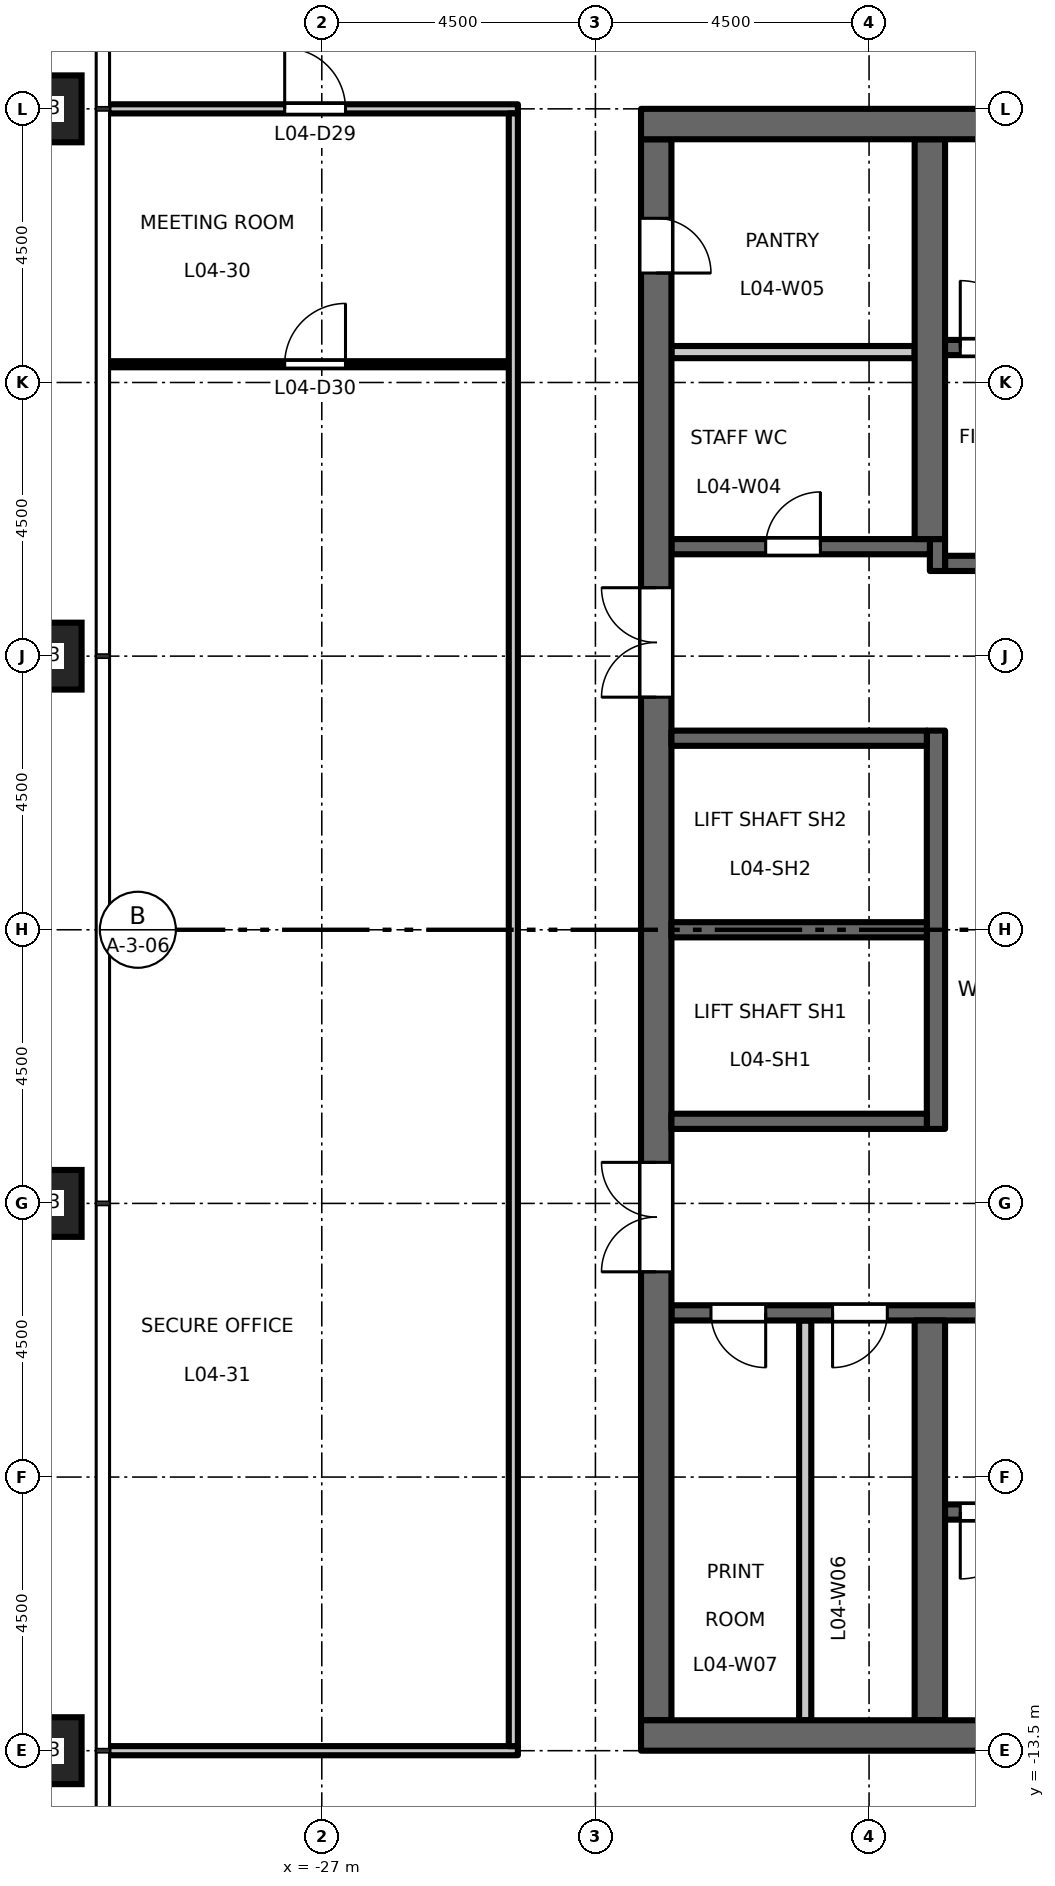
"""IFC4 building model, lengths in metres.
Left out: names, types, materials, properties, quantities, classifications, styles, units other than length and angle.
Written with IfcOpenShell. Run it as: python <this file> out.ifc"""

import sys

from ifc_helpers import new_model, si_unit, direction, frame, frame_2d, origin, origin_2d, place, context, subcontext, project, spatial, rectangle, hollow_rectangle, extrude, element, fill, save


model = new_model("IFC4")
c1 = context("Model", 3, precision=1e-05, world=origin(), true_north=direction((0.0, 1.0)))
c2 = subcontext(c1, "Body", "Model", "MODEL_VIEW")
j1 = project(units=[si_unit("LENGTHUNIT", "METRE"), si_unit("PLANEANGLEUNIT", "RADIAN")], contexts=[c1])
p1 = place(None, origin())
s1 = spatial("IfcSite", under=j1, at=p1, CompositionType="ELEMENT")
p2 = place(p1, origin())
s2 = spatial("IfcBuilding", under=s1, at=p2, CompositionType="ELEMENT")
p3 = place(p2, frame((0.0, 0.0, 22.2)))
s3 = spatial("IfcBuildingStorey", under=s2, at=p3, CompositionType="ELEMENT", Elevation=22.2)
for number, where, z_axis, x_axis in (
    (1, (-31.5, 13.5, 0.0), (0.0, 0.0, 1.0), (1.0, 0.0, 0.0)),
    (2, (-31.5, 4.5, 0.0), (0.0, 0.0, 1.0), (1.0, 0.0, 0.0)),
    (3, (-31.5, -4.5, 0.0), (0.0, 0.0, 1.0), (1.0, 0.0, 0.0)),
    (4, (-31.5, -13.5, 0.0), (0.0, 0.0, 1.0), (1.0, 0.0, 0.0)),
):
    element("IfcColumn", number, at=place(p3, frame(where, z_axis=z_axis, x_axis=x_axis)), inside=s3, PredefinedType="COLUMN", context=c2, shape_type="SweptSolid", body=[
        extrude(hollow_rectangle(XDim=1.1, YDim=1.1, WallThickness=0.07, at=origin_2d()), origin(), (0.0, 0.0, 1.0), 4.5),
    ])
p4 = place(p3, frame((-12.15, 6.025, 0.0), z_axis=(0.0, 0.0, 1.0), x_axis=(-1.0, 0.0, 0.0)))
e5 = element("IfcWall", 5, at=p4, inside=s3, PredefinedType="SHEAR", context=c2, shape_type="SweptSolid", body=[
    extrude(rectangle(XDim=4.6, YDim=0.25, at=frame_2d((2.3, 0.0))), origin(), (0.0, 0.0, 1.0), 4.35),
])
p5 = place(p4, frame((1.8, 0.0, 0.0)))
e6 = element("IfcOpeningElement", 6, at=p5, cuts=e5, PredefinedType="OPENING", context=c2, shape_type="SweptSolid", body=[
    extrude(rectangle(XDim=1.0, YDim=2.1, at=frame_2d((0.5, 1.05))), frame((0.0, 0.135, 0.0), z_axis=(0.0, -1.0, 0.0), x_axis=(1.0, 0.0, 0.0)), (0.0, 0.0, 1.0), 0.27),
])
p6 = place(p3, frame((-16.875, 5.9, 0.0), z_axis=(0.0, 0.0, 1.0), x_axis=(0.0, 1.0, 0.0)))
e7 = element("IfcWall", 7, at=p6, inside=s3, PredefinedType="SHEAR", context=c2, shape_type="SweptSolid", body=[
    extrude(rectangle(XDim=0.525, YDim=0.25, at=frame_2d((0.263, 0.0))), origin(), (0.0, 0.0, 1.0), 4.35),
])
p7 = place(p3, frame((-17.0, 6.3, 0.0), z_axis=(0.0, 0.0, 1.0), x_axis=(-1.0, 0.0, 0.0)))
e8 = element("IfcWall", 8, at=p7, inside=s3, PredefinedType="SHEAR", context=c2, shape_type="SweptSolid", body=[
    extrude(rectangle(XDim=4.25, YDim=0.25, at=frame_2d((2.125, 0.0))), origin(), (0.0, 0.0, 1.0), 4.35),
])
p8 = place(p7, frame((1.8, 0.0, 0.0)))
e9 = element("IfcOpeningElement", 9, at=p8, cuts=e8, PredefinedType="OPENING", context=c2, shape_type="SweptSolid", body=[
    extrude(rectangle(XDim=0.9, YDim=2.1, at=frame_2d((0.45, 1.05))), frame((0.0, 0.135, 0.0), z_axis=(0.0, -1.0, 0.0), x_axis=(1.0, 0.0, 0.0)), (0.0, 0.0, 1.0), 0.27),
])
p9 = place(p3, frame((-12.15, -6.3, 0.0), z_axis=(0.0, 0.0, 1.0), x_axis=(-1.0, 0.0, 0.0)))
e10 = element("IfcWall", 10, at=p9, inside=s3, PredefinedType="SHEAR", context=c2, shape_type="SweptSolid", body=[
    extrude(rectangle(XDim=9.1, YDim=0.25, at=frame_2d((4.55, 0.0))), origin(), (0.0, 0.0, 1.0), 4.35),
])
p10 = place(p9, frame((1.8, 0.0, 0.0)))
e11 = element("IfcOpeningElement", 11, at=p10, cuts=e10, PredefinedType="OPENING", context=c2, shape_type="SweptSolid", body=[
    extrude(rectangle(XDim=1.0, YDim=2.1, at=frame_2d((0.5, 1.05))), frame((0.0, 0.135, 0.0), z_axis=(0.0, -1.0, 0.0), x_axis=(1.0, 0.0, 0.0)), (0.0, 0.0, 1.0), 0.27),
])
p11 = place(p9, frame((5.55, 0.0, 0.0)))
e12 = element("IfcOpeningElement", 12, at=p11, cuts=e10, PredefinedType="OPENING", context=c2, shape_type="SweptSolid", body=[
    extrude(rectangle(XDim=0.9, YDim=2.1, at=frame_2d((0.45, 1.05))), frame((0.0, 0.135, 0.0), z_axis=(0.0, -1.0, 0.0), x_axis=(1.0, 0.0, 0.0)), (0.0, 0.0, 1.0), 0.27),
])
p12 = place(p9, frame((7.55, 0.0, 0.0)))
e13 = element("IfcOpeningElement", 13, at=p12, cuts=e10, PredefinedType="OPENING", context=c2, shape_type="SweptSolid", body=[
    extrude(rectangle(XDim=0.9, YDim=2.1, at=frame_2d((0.45, 1.05))), frame((0.0, 0.135, 0.0), z_axis=(0.0, -1.0, 0.0), x_axis=(1.0, 0.0, 0.0)), (0.0, 0.0, 1.0), 0.27),
])
p13 = place(p3, frame((-21.5, -13.0, 0.0), z_axis=(0.0, 0.0, 1.0), x_axis=(0.0, 1.0, 0.0)))
e14 = element("IfcWall", 14, at=p13, inside=s3, PredefinedType="SHEAR", context=c2, shape_type="SweptSolid", body=[
    extrude(rectangle(XDim=26.0, YDim=0.5, at=frame_2d((13.0, 0.0))), origin(), (0.0, 0.0, 1.0), 4.35),
])
p14 = place(p13, frame((16.825, 0.0, 0.0)))
e15 = element("IfcOpeningElement", 15, at=p14, cuts=e14, PredefinedType="OPENING", context=c2, shape_type="SweptSolid", body=[
    extrude(rectangle(XDim=1.8, YDim=2.1, at=frame_2d((0.9, 1.05))), frame((0.0, 0.26, 0.0), z_axis=(0.0, -1.0, 0.0), x_axis=(1.0, 0.0, 0.0)), (0.0, 0.0, 1.0), 0.52),
])
p15 = place(p13, frame((7.375, 0.0, 0.0)))
e16 = element("IfcOpeningElement", 16, at=p15, cuts=e14, PredefinedType="OPENING", context=c2, shape_type="SweptSolid", body=[
    extrude(rectangle(XDim=1.8, YDim=2.1, at=frame_2d((0.9, 1.05))), frame((0.0, 0.26, 0.0), z_axis=(0.0, -1.0, 0.0), x_axis=(1.0, 0.0, 0.0)), (0.0, 0.0, 1.0), 0.52),
])
p16 = place(p13, frame((23.8, 0.0, 0.0)))
e17 = element("IfcOpeningElement", 17, at=p16, cuts=e14, PredefinedType="OPENING", context=c2, shape_type="SweptSolid", body=[
    extrude(rectangle(XDim=0.9, YDim=2.1, at=frame_2d((0.45, 1.05))), frame((0.0, 0.26, 0.0), z_axis=(0.0, -1.0, 0.0), x_axis=(1.0, 0.0, 0.0)), (0.0, 0.0, 1.0), 0.52),
])
p17 = place(p3, frame((-17.25, 9.5, 0.0), z_axis=(0.0, 0.0, 1.0), x_axis=(-1.0, 0.0, 0.0)))
e18 = element("IfcWall", 18, at=p17, inside=s3, PredefinedType="PARTITIONING", context=c2, shape_type="SweptSolid", body=[
    extrude(rectangle(XDim=4.0, YDim=0.2, at=frame_2d((2.0, 0.0))), origin(), (0.0, 0.0, 1.0), 4.35),
])
p18 = place(p3, frame((-19.05, -13.0, 0.0), z_axis=(0.0, 0.0, 1.0), x_axis=(0.0, 1.0, 0.0)))
e19 = element("IfcWall", 19, at=p18, inside=s3, PredefinedType="PARTITIONING", context=c2, shape_type="SweptSolid", body=[
    extrude(rectangle(XDim=6.575, YDim=0.2, at=frame_2d((3.288, 0.0))), origin(), (0.0, 0.0, 1.0), 4.35),
])
p19 = place(p3, frame((-16.9, -3.275, 0.0), z_axis=(0.0, 0.0, 1.0), x_axis=(0.0, 1.0, 0.0)))
e20 = element("IfcWall", 20, at=p19, inside=s3, PredefinedType="SHEAR", context=c2, shape_type="SweptSolid", body=[
    extrude(rectangle(XDim=6.55, YDim=0.3, at=frame_2d((3.275, 0.0))), origin(), (0.0, 0.0, 1.0), 4.35),
])
for number, where, z_axis, x_axis in (
    (21, (-17.05, 0.0, 0.0), (0.0, 0.0, 1.0), (-1.0, 0.0, 0.0)),
    (22, (-17.05, 3.15, 0.0), (0.0, 0.0, 1.0), (-1.0, 0.0, 0.0)),
    (23, (-17.05, -3.15, 0.0), (0.0, 0.0, 1.0), (-1.0, 0.0, 0.0)),
):
    element("IfcWall", number, at=place(p3, frame(where, z_axis=z_axis, x_axis=x_axis)), inside=s3, PredefinedType="SHEAR", context=c2, shape_type="SweptSolid", body=[
        extrude(rectangle(XDim=4.2, YDim=0.25, at=frame_2d((2.1, 0.0))), origin(), (0.0, 0.0, 1.0), 4.35),
    ])
for number, where, z_axis, x_axis in (
    (24, (-17.0, 6.425, 0.0), (0.0, 0.0, 1.0), (0.0, 1.0, 0.0)),
    (25, (-17.0, -13.0, 0.0), (0.0, 0.0, 1.0), (0.0, 1.0, 0.0)),
):
    element("IfcWall", number, at=place(p3, frame(where, z_axis=z_axis, x_axis=x_axis)), inside=s3, PredefinedType="SHEAR", context=c2, shape_type="SweptSolid", body=[
        extrude(rectangle(XDim=6.575, YDim=0.5, at=frame_2d((3.288, 0.0))), origin(), (0.0, 0.0, 1.0), 4.35),
    ])
p20 = place(p3, frame((-8.75, 9.575, 0.0), z_axis=(0.0, 0.0, 1.0), x_axis=(-1.0, 0.0, 0.0)))
e26 = element("IfcWall", 26, at=p20, inside=s3, PredefinedType="SHEAR", context=c2, shape_type="SweptSolid", body=[
    extrude(rectangle(XDim=8.0, YDim=0.25, at=frame_2d((4.0, 0.0))), origin(), (0.0, 0.0, 1.0), 4.35),
])
p21 = place(p20, frame((6.65, 0.0, 0.0)))
e27 = element("IfcOpeningElement", 27, at=p21, cuts=e26, PredefinedType="OPENING", context=c2, shape_type="SweptSolid", body=[
    extrude(rectangle(XDim=1.1, YDim=2.1, at=frame_2d((0.55, 1.05))), frame((0.0, 0.135, 0.0), z_axis=(0.0, -1.0, 0.0), x_axis=(1.0, 0.0, 0.0)), (0.0, 0.0, 1.0), 0.27),
])
p22 = place(p3, frame((-8.75, -9.575, 0.0), z_axis=(0.0, 0.0, 1.0), x_axis=(-1.0, 0.0, 0.0)))
e28 = element("IfcWall", 28, at=p22, inside=s3, PredefinedType="SHEAR", context=c2, shape_type="SweptSolid", body=[
    extrude(rectangle(XDim=8.0, YDim=0.25, at=frame_2d((4.0, 0.0))), origin(), (0.0, 0.0, 1.0), 4.35),
])
p23 = place(p22, frame((6.65, 0.0, 0.0)))
e29 = element("IfcOpeningElement", 29, at=p23, cuts=e28, PredefinedType="OPENING", context=c2, shape_type="SweptSolid", body=[
    extrude(rectangle(XDim=1.1, YDim=2.1, at=frame_2d((0.55, 1.05))), frame((0.0, 0.135, 0.0), z_axis=(0.0, -1.0, 0.0), x_axis=(1.0, 0.0, 0.0)), (0.0, 0.0, 1.0), 0.27),
])
for number, where, z_axis, x_axis in (
    (30, (-8.25, 13.25, 0.0), (0.0, 0.0, 1.0), (-1.0, 0.0, 0.0)),
    (31, (-8.25, -13.25, 0.0), (0.0, 0.0, 1.0), (-1.0, 0.0, 0.0)),
):
    element("IfcWall", number, at=place(p3, frame(where, z_axis=z_axis, x_axis=x_axis)), inside=s3, PredefinedType="SHEAR", context=c2, shape_type="SweptSolid", body=[
        extrude(rectangle(XDim=13.5, YDim=0.5, at=frame_2d((6.75, 0.0))), origin(), (0.0, 0.0, 1.0), 4.35),
    ])
p24 = place(p3, frame((-30.51, -13.5, 0.0), z_axis=(0.0, 0.0, 1.0), x_axis=(1.0, 0.0, 0.0)))
e32 = element("IfcWall", 32, at=p24, inside=s3, PredefinedType="PARTITIONING", context=c2, shape_type="SweptSolid", body=[
    extrude(rectangle(XDim=6.735, YDim=0.15, at=frame_2d((3.368, 0.0))), origin(), (0.0, 0.0, 1.0), 3.35),
])
p25 = place(p3, frame((-30.51, 9.3, 0.0), z_axis=(0.0, 0.0, 1.0), x_axis=(1.0, 0.0, 0.0)))
e33 = element("IfcWall", 33, at=p25, inside=s3, PredefinedType="PARTITIONING", context=c2, shape_type="SweptSolid", body=[
    extrude(rectangle(XDim=6.585, YDim=0.1, at=frame_2d((3.292, 0.0))), origin(), (0.0, 0.0, 1.0), 4.35),
])
p26 = place(p25, frame((2.9, 0.0, 0.0)))
e34 = element("IfcOpeningElement", 34, at=p26, cuts=e33, PredefinedType="OPENING", context=c2, shape_type="SweptSolid", body=[
    extrude(rectangle(XDim=1.0, YDim=2.1, at=frame_2d((0.5, 1.05))), frame((0.0, 0.06, 0.0), z_axis=(0.0, -1.0, 0.0), x_axis=(1.0, 0.0, 0.0)), (0.0, 0.0, 1.0), 0.12),
])
p27 = place(p3, frame((-30.51, 13.5, 0.0), z_axis=(0.0, 0.0, 1.0), x_axis=(1.0, 0.0, 0.0)))
e35 = element("IfcWall", 35, at=p27, inside=s3, PredefinedType="PARTITIONING", context=c2, shape_type="SweptSolid", body=[
    extrude(rectangle(XDim=6.735, YDim=0.15, at=frame_2d((3.368, 0.0))), origin(), (0.0, 0.0, 1.0), 3.35),
])
p28 = place(p27, frame((2.9, 0.0, 0.0)))
e36 = element("IfcOpeningElement", 36, at=p28, cuts=e35, PredefinedType="OPENING", context=c2, shape_type="SweptSolid", body=[
    extrude(rectangle(XDim=1.0, YDim=2.1, at=frame_2d((0.5, 1.05))), frame((0.0, 0.085, 0.0), z_axis=(0.0, -1.0, 0.0), x_axis=(1.0, 0.0, 0.0)), (0.0, 0.0, 1.0), 0.17),
])
p29 = place(p3, frame((-23.85, -13.425, 0.0), z_axis=(0.0, 0.0, 1.0), x_axis=(0.0, 1.0, 0.0)))
e37 = element("IfcWall", 37, at=p29, inside=s3, PredefinedType="PARTITIONING", context=c2, shape_type="SweptSolid", body=[
    extrude(rectangle(XDim=26.85, YDim=0.15, at=frame_2d((13.425, 0.0))), origin(), (0.0, 0.0, 1.0), 4.35),
])
p30 = place(p21, origin())
e38 = element("IfcDoor", 38, at=p30, inside=s3, OperationType="SINGLE_SWING_RIGHT", PredefinedType="DOOR", context=c2, shape_type="SweptSolid", body=[
    extrude(rectangle(XDim=1.1, YDim=2.1, at=frame_2d((0.55, 1.05))), frame((0.0, 0.025, 0.0), z_axis=(0.0, -1.0, 0.0), x_axis=(1.0, 0.0, 0.0)), (0.0, 0.0, 1.0), 0.05),
])
fill(e27, e38)
p31 = place(p23, origin())
e39 = element("IfcDoor", 39, at=p31, inside=s3, OperationType="SINGLE_SWING_LEFT", PredefinedType="DOOR", context=c2, shape_type="SweptSolid", body=[
    extrude(rectangle(XDim=1.1, YDim=2.1, at=frame_2d((0.55, 1.05))), frame((0.0, 0.025, 0.0), z_axis=(0.0, -1.0, 0.0), x_axis=(1.0, 0.0, 0.0)), (0.0, 0.0, 1.0), 0.05),
])
fill(e29, e39)
p32 = place(p14, origin())
e40 = element("IfcDoor", 40, at=p32, inside=s3, OperationType="DOUBLE_DOOR_DOUBLE_SWING", PredefinedType="DOOR", context=c2, shape_type="SweptSolid", body=[
    extrude(rectangle(XDim=1.8, YDim=2.1, at=frame_2d((0.9, 1.05))), frame((0.0, 0.025, 0.0), z_axis=(0.0, -1.0, 0.0), x_axis=(1.0, 0.0, 0.0)), (0.0, 0.0, 1.0), 0.05),
])
fill(e15, e40)
p33 = place(p15, origin())
e41 = element("IfcDoor", 41, at=p33, inside=s3, OperationType="DOUBLE_DOOR_DOUBLE_SWING", PredefinedType="DOOR", context=c2, shape_type="SweptSolid", body=[
    extrude(rectangle(XDim=1.8, YDim=2.1, at=frame_2d((0.9, 1.05))), frame((0.0, 0.025, 0.0), z_axis=(0.0, -1.0, 0.0), x_axis=(1.0, 0.0, 0.0)), (0.0, 0.0, 1.0), 0.05),
])
fill(e16, e41)
p34 = place(p8, origin())
e42 = element("IfcDoor", 42, at=p34, inside=s3, OperationType="SINGLE_SWING_LEFT", PredefinedType="DOOR", context=c2, shape_type="SweptSolid", body=[
    extrude(rectangle(XDim=0.9, YDim=2.1, at=frame_2d((0.45, 1.05))), frame((0.0, 0.025, 0.0), z_axis=(0.0, -1.0, 0.0), x_axis=(1.0, 0.0, 0.0)), (0.0, 0.0, 1.0), 0.05),
])
fill(e9, e42)
p35 = place(p16, origin())
e43 = element("IfcDoor", 43, at=p35, inside=s3, OperationType="SINGLE_SWING_LEFT", PredefinedType="DOOR", context=c2, shape_type="SweptSolid", body=[
    extrude(rectangle(XDim=0.9, YDim=2.1, at=frame_2d((0.45, 1.05))), frame((0.0, 0.025, 0.0), z_axis=(0.0, -1.0, 0.0), x_axis=(1.0, 0.0, 0.0)), (0.0, 0.0, 1.0), 0.05),
])
fill(e17, e43)
p36 = place(p11, origin())
e44 = element("IfcDoor", 44, at=p36, inside=s3, OperationType="SINGLE_SWING_LEFT", PredefinedType="DOOR", context=c2, shape_type="SweptSolid", body=[
    extrude(rectangle(XDim=0.9, YDim=2.1, at=frame_2d((0.45, 1.05))), frame((0.0, 0.025, 0.0), z_axis=(0.0, -1.0, 0.0), x_axis=(1.0, 0.0, 0.0)), (0.0, 0.0, 1.0), 0.05),
])
fill(e12, e44)
p37 = place(p12, origin())
e45 = element("IfcDoor", 45, at=p37, inside=s3, OperationType="SINGLE_SWING_RIGHT", PredefinedType="DOOR", context=c2, shape_type="SweptSolid", body=[
    extrude(rectangle(XDim=0.9, YDim=2.1, at=frame_2d((0.45, 1.05))), frame((0.0, 0.025, 0.0), z_axis=(0.0, -1.0, 0.0), x_axis=(1.0, 0.0, 0.0)), (0.0, 0.0, 1.0), 0.05),
])
fill(e13, e45)
p38 = place(p28, origin())
e46 = element("IfcDoor", 46, at=p38, inside=s3, OperationType="SINGLE_SWING_LEFT", PredefinedType="DOOR", context=c2, shape_type="SweptSolid", body=[
    extrude(rectangle(XDim=1.0, YDim=2.1, at=frame_2d((0.5, 1.05))), frame((0.0, 0.025, 0.0), z_axis=(0.0, -1.0, 0.0), x_axis=(1.0, 0.0, 0.0)), (0.0, 0.0, 1.0), 0.05),
])
fill(e36, e46)
p39 = place(p26, origin())
e47 = element("IfcDoor", 47, at=p39, inside=s3, OperationType="SINGLE_SWING_RIGHT", PredefinedType="DOOR", context=c2, shape_type="SweptSolid", body=[
    extrude(rectangle(XDim=1.0, YDim=2.1, at=frame_2d((0.5, 1.05))), frame((0.0, 0.025, 0.0), z_axis=(0.0, -1.0, 0.0), x_axis=(1.0, 0.0, 0.0)), (0.0, 0.0, 1.0), 0.05),
])
fill(e34, e47)
save(model, sys.argv[1])
